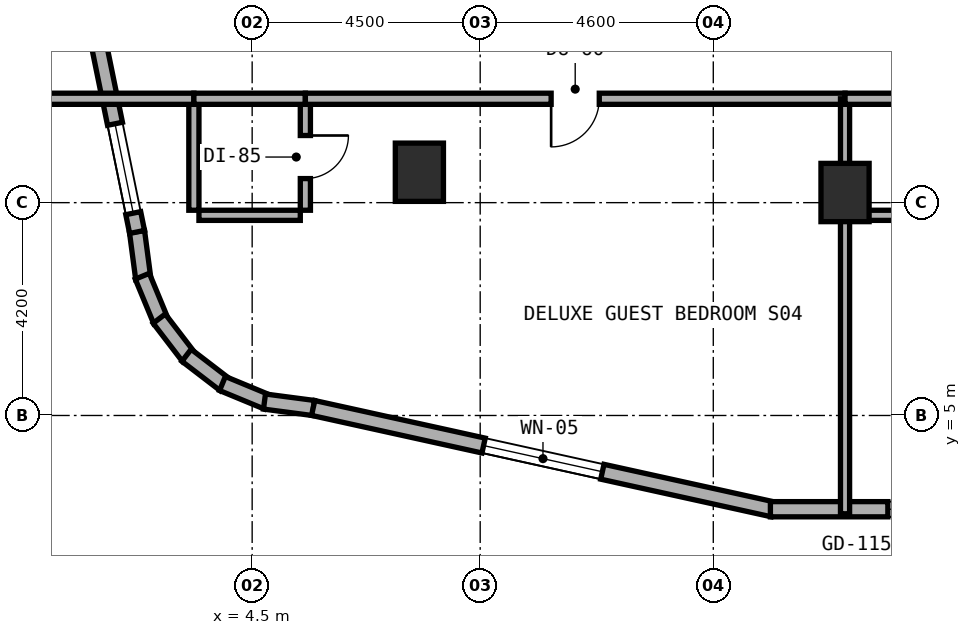
"""IFC4 building model, lengths in metres.
Left out: names, types, materials, properties, quantities, classifications, styles, units other than length and angle.
Written with IfcOpenShell. Run it as: python <this file> out.ifc"""

import sys

from ifc_helpers import new_model, si_unit, direction, frame, frame_2d, origin, origin_2d, place, context, subcontext, project, spatial, rectangle, extrude, element, fill, save


model = new_model("IFC4")
c1 = context("Model", 3, precision=1e-05, world=origin(), true_north=direction((0.0, 1.0)))
c2 = subcontext(c1, "Body", "Model", "MODEL_VIEW")
j1 = project(units=[si_unit("LENGTHUNIT", "METRE"), si_unit("PLANEANGLEUNIT", "RADIAN")], contexts=[c1])
p1 = place(None, origin())
s1 = spatial("IfcSite", under=j1, at=p1, CompositionType="ELEMENT")
p2 = place(p1, origin())
s2 = spatial("IfcBuilding", under=s1, at=p2, CompositionType="ELEMENT")
p3 = place(p2, frame((0.0, 0.0, 69.5)))
s3 = spatial("IfcBuildingStorey", under=s2, at=p3, CompositionType="ELEMENT", Elevation=69.5)
for number, where, z_axis, x_axis in (
    (1, (16.2, 9.4, 0.0), (0.0, 0.0, 1.0), (1.0, 0.0, 0.0)),
    (2, (7.8, 9.8, 0.0), (0.0, 0.0, 1.0), (1.0, 0.0, 0.0)),
):
    element("IfcColumn", number, at=place(p3, frame(where, z_axis=z_axis, x_axis=x_axis)), inside=s3, PredefinedType="COLUMN", context=c2, shape_type="SweptSolid", body=[
        extrude(rectangle(XDim=0.95, YDim=1.15, at=origin_2d()), origin(), (0.0, 0.0, 1.0), 3.5),
    ])
p4 = place(p3, frame((2.228, 8.628, 0.0), z_axis=(0.0, 0.0, 1.0), x_axis=(0.131174864804, -0.991359246108, 0.0)))
e3 = element("IfcWall", 3, at=p4, inside=s3, PredefinedType="STANDARD", context=c2, shape_type="SweptSolid", body=[
    extrude(rectangle(XDim=0.938, YDim=0.3, at=frame_2d((0.469, 0.0))), origin(), (0.0, 0.0, 1.0), 3.22),
])
p5 = place(p3, frame((2.332, 7.748, 0.0), z_axis=(0.0, 0.0, 1.0), x_axis=(0.382344263057, -0.924019948111, 0.0)))
e4 = element("IfcWall", 4, at=p5, inside=s3, PredefinedType="STANDARD", context=c2, shape_type="SweptSolid", body=[
    extrude(rectangle(XDim=0.955, YDim=0.3, at=frame_2d((0.477, 0.0))), origin(), (0.0, 0.0, 1.0), 3.22),
])
for number, where, z_axis, x_axis in (
    (5, (2.666, 6.911, 0.0), (0.0, 0.0, 1.0), (0.608, -0.794, 0.0)),
    (6, (3.205, 6.188, 0.0), (0.0, 0.0, 1.0), (0.794, -0.608, 0.0)),
):
    element("IfcWall", number, at=place(p3, frame(where, z_axis=z_axis, x_axis=x_axis)), inside=s3, PredefinedType="STANDARD", context=c2, shape_type="SweptSolid", body=[
        extrude(rectangle(XDim=0.955, YDim=0.3, at=frame_2d((0.478, 0.0))), origin(), (0.0, 0.0, 1.0), 3.22),
    ])
p6 = place(p3, frame((3.914, 5.631, 0.0), z_axis=(0.0, 0.0, 1.0), x_axis=(0.923982547689, -0.382434636986, 0.0)))
e7 = element("IfcWall", 7, at=p6, inside=s3, PredefinedType="STANDARD", context=c2, shape_type="SweptSolid", body=[
    extrude(rectangle(XDim=0.954, YDim=0.3, at=frame_2d((0.477, 0.0))), origin(), (0.0, 0.0, 1.0), 3.22),
])
p7 = place(p3, frame((4.743, 5.275, 0.0), z_axis=(0.0, 0.0, 1.0), x_axis=(0.99145856342, -0.130422072598, 0.0)))
e8 = element("IfcWall", 8, at=p7, inside=s3, PredefinedType="STANDARD", context=c2, shape_type="SweptSolid", body=[
    extrude(rectangle(XDim=0.973, YDim=0.3, at=frame_2d((0.487, 0.0))), origin(), (0.0, 0.0, 1.0), 3.22),
])
p8 = place(p3, frame((5.704, 5.148, 0.0), z_axis=(0.0, 0.0, 1.0), x_axis=(0.976539545934, -0.215338141596, 0.0)))
e9 = element("IfcWall", 9, at=p8, inside=s3, PredefinedType="STANDARD", context=c2, shape_type="SweptSolid", body=[
    extrude(rectangle(XDim=9.288, YDim=0.3, at=frame_2d((4.644, 0.0))), origin(), (0.0, 0.0, 1.0), 3.22),
])
p9 = place(p8, frame((3.444, 0.0, 0.8)))
e10 = element("IfcOpeningElement", 10, at=p9, cuts=e9, PredefinedType="OPENING", context=c2, shape_type="SweptSolid", body=[
    extrude(rectangle(XDim=2.4, YDim=1.6, at=frame_2d((1.2, 0.8))), frame((0.0, 0.16, 0.0), z_axis=(0.0, -1.0, 0.0), x_axis=(1.0, 0.0, 0.0)), (0.0, 0.0, 1.0), 0.32),
])
p10 = place(p3, frame((14.727, 3.15, 0.0), z_axis=(0.0, 0.0, 1.0), x_axis=(1.0, 0.0, 0.0)))
e11 = element("IfcWall", 11, at=p10, inside=s3, PredefinedType="STANDARD", context=c2, shape_type="SweptSolid", body=[
    extrude(rectangle(XDim=12.591, YDim=0.3, at=frame_2d((6.295, 0.0))), origin(), (0.0, 0.0, 1.0), 3.22),
])
p11 = place(p10, frame((5.713, 0.0, 0.0)))
e12 = element("IfcOpeningElement", 12, at=p11, cuts=e11, PredefinedType="OPENING", context=c2, shape_type="SweptSolid", body=[
    extrude(rectangle(XDim=1.2, YDim=2.15, at=frame_2d((0.6, 1.075))), frame((0.0, 0.16, 0.0), z_axis=(0.0, -1.0, 0.0), x_axis=(1.0, 0.0, 0.0)), (0.0, 0.0, 1.0), 0.32),
])
p12 = place(p10, frame((2.318, 0.0, 0.8)))
e13 = element("IfcOpeningElement", 13, at=p12, cuts=e11, PredefinedType="OPENING", context=c2, shape_type="SweptSolid", body=[
    extrude(rectangle(XDim=2.4, YDim=1.6, at=frame_2d((1.2, 0.8))), frame((0.0, 0.16, 0.0), z_axis=(0.0, -1.0, 0.0), x_axis=(1.0, 0.0, 0.0)), (0.0, 0.0, 1.0), 0.32),
])
p13 = place(p10, frame((7.868, 0.0, 0.8)))
e14 = element("IfcOpeningElement", 14, at=p13, cuts=e11, PredefinedType="OPENING", context=c2, shape_type="SweptSolid", body=[
    extrude(rectangle(XDim=2.4, YDim=1.6, at=frame_2d((1.2, 0.8))), frame((0.0, 0.16, 0.0), z_axis=(0.0, -1.0, 0.0), x_axis=(1.0, 0.0, 0.0)), (0.0, 0.0, 1.0), 0.32),
])
p14 = place(p3, frame((0.216, 18.484, 0.0), z_axis=(0.0, 0.0, 1.0), x_axis=(0.199990901713, -0.979797754249, 0.0)))
e15 = element("IfcWall", 15, at=p14, inside=s3, PredefinedType="STANDARD", context=c2, shape_type="SweptSolid", body=[
    extrude(rectangle(XDim=10.065, YDim=0.3, at=frame_2d((5.033, 0.0))), origin(), (0.0, 0.0, 1.0), 3.22),
])
p15 = place(p14, frame((2.429, 0.0, 0.8)))
e16 = element("IfcOpeningElement", 16, at=p15, cuts=e15, PredefinedType="OPENING", context=c2, shape_type="SweptSolid", body=[
    extrude(rectangle(XDim=2.4, YDim=1.6, at=frame_2d((1.2, 0.8))), frame((0.0, 0.16, 0.0), z_axis=(0.0, -1.0, 0.0), x_axis=(1.0, 0.0, 0.0)), (0.0, 0.0, 1.0), 0.32),
])
p16 = place(p14, frame((7.887, 0.0, 0.85)))
e17 = element("IfcOpeningElement", 17, at=p16, cuts=e15, PredefinedType="OPENING", context=c2, shape_type="SweptSolid", body=[
    extrude(rectangle(XDim=1.8, YDim=1.5, at=frame_2d((0.9, 0.75))), frame((0.0, 0.16, 0.0), z_axis=(0.0, -1.0, 0.0), x_axis=(1.0, 0.0, 0.0)), (0.0, 0.0, 1.0), 0.32),
])
p17 = place(p3, frame((5.55, 9.05, 0.0), z_axis=(0.0, 0.0, 1.0), x_axis=(0.0, 1.0, 0.0)))
e18 = element("IfcWall", 18, at=p17, inside=s3, PredefinedType="PLUMBINGWALL", context=c2, shape_type="SweptSolid", body=[
    extrude(rectangle(XDim=2.1, YDim=0.2, at=frame_2d((1.05, 0.0))), origin(), (0.0, 0.0, 1.0), 3.22),
])
p18 = place(p17, frame((0.625, 0.0, 0.0)))
e19 = element("IfcOpeningElement", 19, at=p18, cuts=e18, PredefinedType="OPENING", context=c2, shape_type="SweptSolid", body=[
    extrude(rectangle(XDim=0.85, YDim=2.1, at=frame_2d((0.425, 1.05))), frame((0.0, 0.11, 0.0), z_axis=(0.0, -1.0, 0.0), x_axis=(1.0, 0.0, 0.0)), (0.0, 0.0, 1.0), 0.22),
])
p19 = place(p3, frame((3.45, 8.95, 0.0), z_axis=(0.0, 0.0, 1.0), x_axis=(1.0, 0.0, 0.0)))
e20 = element("IfcWall", 20, at=p19, inside=s3, PredefinedType="PLUMBINGWALL", context=c2, shape_type="SweptSolid", body=[
    extrude(rectangle(XDim=2.0, YDim=0.2, at=frame_2d((1.0, 0.0))), origin(), (0.0, 0.0, 1.0), 3.22),
])
p20 = place(p3, frame((3.35, 9.05, 0.0), z_axis=(0.0, 0.0, 1.0), x_axis=(0.0, 1.0, 0.0)))
e21 = element("IfcWall", 21, at=p20, inside=s3, PredefinedType="PLUMBINGWALL", context=c2, shape_type="SweptSolid", body=[
    extrude(rectangle(XDim=2.1, YDim=0.2, at=frame_2d((1.05, 0.0))), origin(), (0.0, 0.0, 1.0), 3.22),
])
p21 = place(p3, frame((0.24, 11.25, 0.0), z_axis=(0.0, 0.0, 1.0), x_axis=(1.0, 0.0, 0.0)))
e22 = element("IfcWall", 22, at=p21, inside=s3, PredefinedType="SOLIDWALL", context=c2, shape_type="SweptSolid", body=[
    extrude(rectangle(XDim=3.11, YDim=0.22, at=frame_2d((1.555, 0.0))), origin(), (0.0, 0.0, 1.0), 3.22),
])
p22 = place(p3, frame((3.35, 11.25, 0.0), z_axis=(0.0, 0.0, 1.0), x_axis=(1.0, 0.0, 0.0)))
e23 = element("IfcWall", 23, at=p22, inside=s3, PredefinedType="SOLIDWALL", context=c2, shape_type="SweptSolid", body=[
    extrude(rectangle(XDim=2.2, YDim=0.22, at=frame_2d((1.1, 0.0))), origin(), (0.0, 0.0, 1.0), 3.22),
])
p23 = place(p3, frame((5.55, 11.25, 0.0), z_axis=(0.0, 0.0, 1.0), x_axis=(1.0, 0.0, 0.0)))
e24 = element("IfcWall", 24, at=p23, inside=s3, PredefinedType="SOLIDWALL", context=c2, shape_type="SweptSolid", body=[
    extrude(rectangle(XDim=10.65, YDim=0.22, at=frame_2d((5.325, 0.0))), origin(), (0.0, 0.0, 1.0), 2.495),
])
p24 = place(p23, frame((4.85, 0.0, 0.0)))
e25 = element("IfcOpeningElement", 25, at=p24, cuts=e24, PredefinedType="OPENING", context=c2, shape_type="SweptSolid", body=[
    extrude(rectangle(XDim=0.95, YDim=2.1, at=frame_2d((0.475, 1.05))), frame((0.0, 0.12, 0.0), z_axis=(0.0, -1.0, 0.0), x_axis=(1.0, 0.0, 0.0)), (0.0, 0.0, 1.0), 0.24),
])
p25 = place(p3, frame((16.2, 3.06, 0.0), z_axis=(0.0, 0.0, 1.0), x_axis=(0.0, 1.0, 0.0)))
e26 = element("IfcWall", 26, at=p25, inside=s3, PredefinedType="SOLIDWALL", context=c2, shape_type="SweptSolid", body=[
    extrude(rectangle(XDim=8.19, YDim=0.18, at=frame_2d((4.095, 0.0))), origin(), (0.0, 0.0, 1.0), 2.495),
])
p26 = place(p3, frame((16.3, 8.95, 0.0), z_axis=(0.0, 0.0, 1.0), x_axis=(1.0, 0.0, 0.0)))
e27 = element("IfcWall", 27, at=p26, inside=s3, PredefinedType="PLUMBINGWALL", context=c2, shape_type="SweptSolid", body=[
    extrude(rectangle(XDim=2.0, YDim=0.2, at=frame_2d((1.0, 0.0))), origin(), (0.0, 0.0, 1.0), 3.22),
])
p27 = place(p3, frame((16.2, 11.25, 0.0), z_axis=(0.0, 0.0, 1.0), x_axis=(1.0, 0.0, 0.0)))
e28 = element("IfcWall", 28, at=p27, inside=s3, PredefinedType="SOLIDWALL", context=c2, shape_type="SweptSolid", body=[
    extrude(rectangle(XDim=2.2, YDim=0.22, at=frame_2d((1.1, 0.0))), origin(), (0.0, 0.0, 1.0), 2.495),
])
p28 = place(p9, origin())
e29 = element("IfcWindow", 29, at=p28, inside=s3, PartitioningType="SINGLE_PANEL", PredefinedType="WINDOW", context=c2, shape_type="SweptSolid", body=[
    extrude(rectangle(XDim=2.4, YDim=1.6, at=frame_2d((1.2, 0.8))), frame((0.0, 0.03, 0.0), z_axis=(0.0, -1.0, 0.0), x_axis=(1.0, 0.0, 0.0)), (0.0, 0.0, 1.0), 0.06),
])
fill(e10, e29)
p29 = place(p12, origin())
e30 = element("IfcWindow", 30, at=p29, inside=s3, PartitioningType="SINGLE_PANEL", PredefinedType="WINDOW", context=c2, shape_type="SweptSolid", body=[
    extrude(rectangle(XDim=2.4, YDim=1.6, at=frame_2d((1.2, 0.8))), frame((0.0, 0.03, 0.0), z_axis=(0.0, -1.0, 0.0), x_axis=(1.0, 0.0, 0.0)), (0.0, 0.0, 1.0), 0.06),
])
fill(e13, e30)
p30 = place(p16, origin())
e31 = element("IfcWindow", 31, at=p30, inside=s3, PartitioningType="SINGLE_PANEL", PredefinedType="WINDOW", context=c2, shape_type="SweptSolid", body=[
    extrude(rectangle(XDim=1.8, YDim=1.5, at=frame_2d((0.9, 0.75))), frame((0.0, 0.03, 0.0), z_axis=(0.0, -1.0, 0.0), x_axis=(1.0, 0.0, 0.0)), (0.0, 0.0, 1.0), 0.06),
])
fill(e17, e31)
p31 = place(p18, frame((0.85, 0.0, 0.0), z_axis=(0.0, 0.0, 1.0), x_axis=(-1.0, 0.0, 0.0)))
e32 = element("IfcDoor", 32, at=p31, inside=s3, OperationType="SINGLE_SWING_LEFT", PredefinedType="DOOR", context=c2, shape_type="SweptSolid", body=[
    extrude(rectangle(XDim=0.85, YDim=2.1, at=frame_2d((0.425, 1.05))), frame((0.0, 0.025, 0.0), z_axis=(0.0, -1.0, 0.0), x_axis=(1.0, 0.0, 0.0)), (0.0, 0.0, 1.0), 0.05),
])
fill(e19, e32)
p32 = place(p24, frame((0.95, 0.0, 0.0), z_axis=(0.0, 0.0, 1.0), x_axis=(-1.0, 0.0, 0.0)))
e33 = element("IfcDoor", 33, at=p32, inside=s3, OperationType="SINGLE_SWING_RIGHT", PredefinedType="DOOR", context=c2, shape_type="SweptSolid", body=[
    extrude(rectangle(XDim=0.95, YDim=2.1, at=frame_2d((0.475, 1.05))), frame((0.0, 0.025, 0.0), z_axis=(0.0, -1.0, 0.0), x_axis=(1.0, 0.0, 0.0)), (0.0, 0.0, 1.0), 0.05),
])
fill(e25, e33)
save(model, sys.argv[1])
